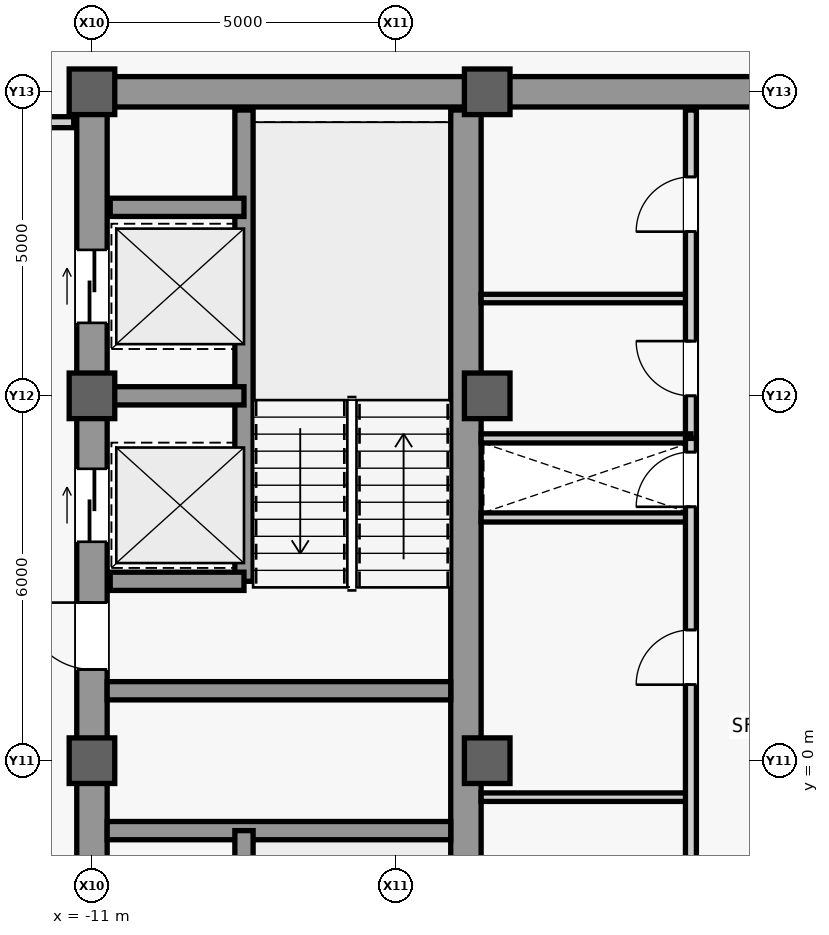
"""IFC4 building model, lengths in metres.
Left out: names, types, materials, properties, quantities, classifications, styles, units other than length and angle.
Written with IfcOpenShell. Run it as: python <this file> out.ifc"""

import sys

from ifc_helpers import new_model, si_unit, direction, frame, frame_2d, origin, origin_2d, place, context, subcontext, project, spatial, rectangle, extrude, source, transform, mapped, element, fill, save


model = new_model("IFC4")
c1 = context("Model", 3, precision=1e-05, world=origin(), true_north=direction((0.0, 1.0)))
c2 = subcontext(c1, "Body", "Model", "MODEL_VIEW")
j1 = project(units=[si_unit("LENGTHUNIT", "METRE"), si_unit("PLANEANGLEUNIT", "RADIAN")], contexts=[c1])
p1 = place(None, origin())
s1 = spatial("IfcSite", under=j1, at=p1, CompositionType="ELEMENT")
p2 = place(p1, origin())
s2 = spatial("IfcBuilding", under=s1, at=p2, CompositionType="ELEMENT")
p3 = place(p2, frame((0.0, 0.0, 326.3)))
s3 = spatial("IfcBuildingStorey", under=s2, at=p3, CompositionType="ELEMENT", Elevation=326.3)
m1 = source(origin(), c2, "Body", "SweptSolid", [
    extrude(rectangle(XDim=22.0, YDim=0.5, at=frame_2d((11.0, 0.0))), origin(), (0.0, 0.0, 1.0), 3.74),
])
p4 = place(p3, frame((-11.0, -11.0, 0.0), z_axis=(0.0, 0.0, 1.0), x_axis=(0.0, 1.0, 0.0)))
e1 = element("IfcWall", 1, at=p4, inside=s3, PredefinedType="SHEAR", context=c2, shape_type="MappedRepresentation", body=[
    mapped(m1, transform((0.0, 0.0, 0.0), scale=1.0)),
])
m2 = source(origin(), c2, "Body", "SweptSolid", [
    extrude(rectangle(XDim=1.1, YDim=2.2, at=frame_2d((0.55, 1.1))), frame((0.0, 0.26, 0.0), z_axis=(0.0, -1.0, 0.0), x_axis=(1.0, 0.0, 0.0)), (0.0, 0.0, 1.0), 0.52),
])
p5 = place(p4, frame((0.8, 0.0, 0.0)))
e2 = element("IfcOpeningElement", 2, at=p5, cuts=e1, PredefinedType="OPENING", context=c2, shape_type="MappedRepresentation", body=[
    mapped(m2, transform((0.0, 0.0, 0.0), scale=1.0)),
])
p6 = place(p4, frame((12.5, 0.0, 0.0)))
e3 = element("IfcOpeningElement", 3, at=p6, cuts=e1, PredefinedType="OPENING", context=c2, shape_type="MappedRepresentation", body=[
    mapped(m2, transform((0.0, 0.0, 0.0), scale=1.0)),
])
m3 = source(origin(), c2, "Body", "SweptSolid", [
    extrude(rectangle(XDim=0.9, YDim=2.15, at=frame_2d((0.45, 1.075))), frame((0.0, 0.26, 0.0), z_axis=(0.0, -1.0, 0.0), x_axis=(1.0, 0.0, 0.0)), (0.0, 0.0, 1.0), 0.52),
])
p7 = place(p4, frame((7.575, 0.0, 0.0)))
e4 = element("IfcOpeningElement", 4, at=p7, cuts=e1, PredefinedType="OPENING", context=c2, shape_type="MappedRepresentation", body=[
    mapped(m3, transform((0.0, 0.0, 0.0), scale=1.0)),
])
m4 = source(origin(), c2, "Body", "SweptSolid", [
    extrude(rectangle(XDim=1.2, YDim=2.3, at=frame_2d((0.6, 1.15))), frame((0.0, 0.26, 0.0), z_axis=(0.0, -1.0, 0.0), x_axis=(1.0, 0.0, 0.0)), (0.0, 0.0, 1.0), 0.52),
])
p8 = place(p4, frame((14.6, 0.0, 0.0)))
e5 = element("IfcOpeningElement", 5, at=p8, cuts=e1, PredefinedType="OPENING", context=c2, shape_type="MappedRepresentation", body=[
    mapped(m4, transform((0.0, 0.0, 0.0), scale=1.0)),
])
p9 = place(p4, frame((18.2, 0.0, 0.0)))
e6 = element("IfcOpeningElement", 6, at=p9, cuts=e1, PredefinedType="OPENING", context=c2, shape_type="MappedRepresentation", body=[
    mapped(m4, transform((0.0, 0.0, 0.0), scale=1.0)),
])
m5 = source(origin(), c2, "Body", "SweptSolid", [
    extrude(rectangle(XDim=1.3, YDim=2.3, at=frame_2d((0.65, 1.15))), frame((0.0, 0.26, 0.0), z_axis=(0.0, -1.0, 0.0), x_axis=(1.0, 0.0, 0.0)), (0.0, 0.0, 1.0), 0.52),
])
p10 = place(p4, frame((2.7, 0.0, 0.0)))
e7 = element("IfcOpeningElement", 7, at=p10, cuts=e1, PredefinedType="OPENING", context=c2, shape_type="MappedRepresentation", body=[
    mapped(m5, transform((0.0, 0.0, 0.0), scale=1.0)),
])
m6 = source(origin(), c2, "Body", "SweptSolid", [
    extrude(rectangle(XDim=21.4, YDim=0.5, at=frame_2d((10.7, 0.0))), origin(), (0.0, 0.0, 1.0), 3.74),
])
p11 = place(p3, frame((-4.85, -10.7, 0.0), z_axis=(0.0, 0.0, 1.0), x_axis=(0.0, 1.0, 0.0)))
e8 = element("IfcWall", 8, at=p11, inside=s3, PredefinedType="SHEAR", context=c2, shape_type="MappedRepresentation", body=[
    mapped(m6, transform((0.0, 0.0, 0.0), scale=1.0)),
])
m7 = source(origin(), c2, "Body", "SweptSolid", [
    extrude(rectangle(XDim=5.9, YDim=0.5, at=frame_2d((2.95, 0.0))), origin(), (0.0, 0.0, 1.0), 3.74),
])
p12 = place(p3, frame((-10.75, 11.0, 0.0), z_axis=(0.0, 0.0, 1.0), x_axis=(1.0, 0.0, 0.0)))
e9 = element("IfcWall", 9, at=p12, inside=s3, PredefinedType="SHEAR", context=c2, shape_type="MappedRepresentation", body=[
    mapped(m7, transform((0.0, 0.0, 0.0), scale=1.0)),
])
m8 = source(origin(), c2, "Body", "SweptSolid", [
    extrude(rectangle(XDim=5.65, YDim=0.3, at=frame_2d((2.825, 0.0))), origin(), (0.0, 0.0, 1.0), 3.74),
])
for number, where, z_axis, x_axis in (
    (10, (-10.75, -1.15, 0.0), (0.0, 0.0, 1.0), (1.0, 0.0, 0.0)),
    (11, (-10.75, 1.15, 0.0), (0.0, 0.0, 1.0), (1.0, 0.0, 0.0)),
):
    element("IfcWall", number, at=place(p3, frame(where, z_axis=z_axis, x_axis=x_axis)), inside=s3, PredefinedType="SHEAR", context=c2, shape_type="MappedRepresentation", body=[
        mapped(m8, transform((0.0, 0.0, 0.0), scale=1.0)),
    ])
m9 = source(origin(), c2, "Body", "SweptSolid", [
    extrude(rectangle(XDim=9.2, YDim=0.5, at=frame_2d((4.6, 0.0))), origin(), (0.0, 0.0, 1.0), 3.74),
])
p13 = place(p3, frame((-4.6, 11.0, 0.0), z_axis=(0.0, 0.0, 1.0), x_axis=(1.0, 0.0, 0.0)))
e12 = element("IfcWall", 12, at=p13, inside=s3, PredefinedType="SHEAR", context=c2, shape_type="MappedRepresentation", body=[
    mapped(m9, transform((0.0, 0.0, 0.0), scale=1.0)),
])
m10 = source(origin(), c2, "Body", "SweptSolid", [
    extrude(rectangle(XDim=0.75, YDim=0.75, at=origin_2d()), origin(), (0.0, 0.0, 1.0), 4.0),
])
for number, where, z_axis, x_axis in (
    (13, (-11.0, 0.0, 0.0), (0.0, 0.0, 1.0), (1.0, 0.0, 0.0)),
    (14, (-11.0, 6.0, 0.0), (0.0, 0.0, 1.0), (1.0, 0.0, 0.0)),
    (15, (-11.0, 11.0, 0.0), (0.0, 0.0, 1.0), (1.0, 0.0, 0.0)),
    (16, (-4.5, 0.0, 0.0), (0.0, 0.0, 1.0), (1.0, 0.0, 0.0)),
    (17, (-4.5, 6.0, 0.0), (0.0, 0.0, 1.0), (1.0, 0.0, 0.0)),
    (18, (-4.5, 11.0, 0.0), (0.0, 0.0, 1.0), (1.0, 0.0, 0.0)),
):
    element("IfcColumn", number, at=place(p3, frame(where, z_axis=z_axis, x_axis=x_axis)), inside=s3, PredefinedType="COLUMN", context=c2, shape_type="MappedRepresentation", body=[
        mapped(m10, transform((0.0, 0.0, 0.0), scale=1.0)),
    ])
m11 = source(origin(), c2, "Body", "SweptSolid", [
    extrude(rectangle(XDim=7.8, YDim=0.3, at=frame_2d((3.9, 0.0))), origin(), (0.0, 0.0, 1.0), 3.74),
])
p14 = place(p3, frame((-8.5, -8.95, 0.0), z_axis=(0.0, 0.0, 1.0), x_axis=(0.0, 1.0, 0.0)))
e19 = element("IfcWall", 19, at=p14, inside=s3, PredefinedType="SHEAR", context=c2, shape_type="MappedRepresentation", body=[
    mapped(m11, transform((0.0, 0.0, 0.0), scale=1.0)),
])
m12 = source(origin(), c2, "Body", "SweptSolid", [
    extrude(rectangle(XDim=7.75, YDim=0.3, at=frame_2d((3.875, 0.0))), origin(), (0.0, 0.0, 1.0), 3.74),
])
p15 = place(p3, frame((-8.5, 2.95, 0.0), z_axis=(0.0, 0.0, 1.0), x_axis=(0.0, 1.0, 0.0)))
e20 = element("IfcWall", 20, at=p15, inside=s3, PredefinedType="SHEAR", context=c2, shape_type="MappedRepresentation", body=[
    mapped(m12, transform((0.0, 0.0, 0.0), scale=1.0)),
])
m13 = source(origin(), c2, "Body", "SweptSolid", [
    extrude(rectangle(XDim=2.2, YDim=0.3, at=frame_2d((1.1, 0.0))), origin(), (0.0, 0.0, 1.0), 3.74),
])
for number, where, z_axis, x_axis in (
    (21, (-10.7, 2.95, 0.0), (0.0, 0.0, 1.0), (1.0, 0.0, 0.0)),
    (22, (-10.7, 6.0, 0.0), (0.0, 0.0, 1.0), (1.0, 0.0, 0.0)),
    (23, (-10.7, 9.1, 0.0), (0.0, 0.0, 1.0), (1.0, 0.0, 0.0)),
):
    element("IfcWall", number, at=place(p3, frame(where, z_axis=z_axis, x_axis=x_axis)), inside=s3, PredefinedType="SHEAR", context=c2, shape_type="MappedRepresentation", body=[
        mapped(m13, transform((0.0, 0.0, 0.0), scale=1.0)),
    ])
m14 = source(origin(), c2, "Body", "SweptSolid", [
    extrude(rectangle(XDim=4.05, YDim=0.18, at=frame_2d((2.025, 0.0))), origin(), (0.0, 0.0, 1.0), 3.74),
])
p16 = place(p3, frame((-15.35, 10.5, 0.0), z_axis=(0.0, 0.0, 1.0), x_axis=(1.0, 0.0, 0.0)))
e24 = element("IfcWall", 24, at=p16, inside=s3, PredefinedType="PARTITIONING", context=c2, shape_type="MappedRepresentation", body=[
    mapped(m14, transform((0.0, 0.0, 0.0), scale=1.0)),
])
m15 = source(origin(), c2, "Body", "SweptSolid", [
    extrude(rectangle(XDim=3.45, YDim=0.15, at=frame_2d((1.725, 0.0))), origin(), (0.0, 0.0, 1.0), 3.74),
])
p17 = place(p3, frame((-4.6, 4.0, 0.0), z_axis=(0.0, 0.0, 1.0), x_axis=(1.0, 0.0, 0.0)))
e25 = element("IfcWall", 25, at=p17, inside=s3, PredefinedType="PARTITIONING", context=c2, shape_type="MappedRepresentation", body=[
    mapped(m15, transform((0.0, 0.0, 0.0), scale=1.0)),
])
m16 = source(origin(), c2, "Body", "SweptSolid", [
    extrude(rectangle(XDim=3.45, YDim=0.14, at=frame_2d((1.725, 0.0))), origin(), (0.0, 0.0, 1.0), 3.74),
])
p18 = place(p3, frame((-4.6, 7.6, 0.0), z_axis=(0.0, 0.0, 1.0), x_axis=(1.0, 0.0, 0.0)))
e26 = element("IfcWall", 26, at=p18, inside=s3, PredefinedType="PARTITIONING", context=c2, shape_type="MappedRepresentation", body=[
    mapped(m16, transform((0.0, 0.0, 0.0), scale=1.0)),
])
m17 = source(origin(), c2, "Body", "SweptSolid", [
    extrude(rectangle(XDim=5.4, YDim=0.18, at=frame_2d((2.7, 0.0))), origin(), (0.0, 0.0, 1.0), 3.74),
])
p19 = place(p3, frame((-1.15, 5.3, 0.0), z_axis=(0.0, 0.0, 1.0), x_axis=(0.0, 1.0, 0.0)))
e27 = element("IfcWall", 27, at=p19, inside=s3, PredefinedType="PARTITIONING", context=c2, shape_type="MappedRepresentation", body=[
    mapped(m17, transform((0.0, 0.0, 0.0), scale=1.0)),
])
m18 = source(origin(), c2, "Body", "SweptSolid", [
    extrude(rectangle(XDim=0.9, YDim=2.15, at=frame_2d((0.45, 1.075))), frame((0.0, 0.1, 0.0), z_axis=(0.0, -1.0, 0.0), x_axis=(1.0, 0.0, 0.0)), (0.0, 0.0, 1.0), 0.2),
])
p20 = place(p19, frame((0.7, 0.0, 0.0)))
e28 = element("IfcOpeningElement", 28, at=p20, cuts=e27, PredefinedType="OPENING", context=c2, shape_type="MappedRepresentation", body=[
    mapped(m18, transform((0.0, 0.0, 0.0), scale=1.0)),
])
p21 = place(p19, frame((3.4, 0.0, 0.0)))
e29 = element("IfcOpeningElement", 29, at=p21, cuts=e27, PredefinedType="OPENING", context=c2, shape_type="MappedRepresentation", body=[
    mapped(m18, transform((0.0, 0.0, 0.0), scale=1.0)),
])
p22 = place(p3, frame((-4.6, 5.3, 0.0), z_axis=(0.0, 0.0, 1.0), x_axis=(1.0, 0.0, 0.0)))
e30 = element("IfcWall", 30, at=p22, inside=s3, PredefinedType="PARTITIONING", context=c2, shape_type="MappedRepresentation", body=[
    mapped(m15, transform((0.0, 0.0, 0.0), scale=1.0)),
])
p23 = place(p3, frame((-4.6, -0.6, 0.0), z_axis=(0.0, 0.0, 1.0), x_axis=(1.0, 0.0, 0.0)))
e31 = element("IfcWall", 31, at=p23, inside=s3, PredefinedType="PARTITIONING", context=c2, shape_type="MappedRepresentation", body=[
    mapped(m16, transform((0.0, 0.0, 0.0), scale=1.0)),
])
m19 = source(origin(), c2, "Body", "SweptSolid", [
    extrude(rectangle(XDim=10.6, YDim=0.18, at=frame_2d((5.3, 0.0))), origin(), (0.0, 0.0, 1.0), 3.74),
])
p24 = place(p3, frame((-1.15, -5.3, 0.0), z_axis=(0.0, 0.0, 1.0), x_axis=(0.0, 1.0, 0.0)))
e32 = element("IfcWall", 32, at=p24, inside=s3, PredefinedType="PARTITIONING", context=c2, shape_type="MappedRepresentation", body=[
    mapped(m19, transform((0.0, 0.0, 0.0), scale=1.0)),
])
p25 = place(p24, frame((1.9, 0.0, 0.0)))
e33 = element("IfcOpeningElement", 33, at=p25, cuts=e32, PredefinedType="OPENING", context=c2, shape_type="MappedRepresentation", body=[
    mapped(m18, transform((0.0, 0.0, 0.0), scale=1.0)),
])
p26 = place(p24, frame((6.55, 0.0, 0.0)))
e34 = element("IfcOpeningElement", 34, at=p26, cuts=e32, PredefinedType="OPENING", context=c2, shape_type="MappedRepresentation", body=[
    mapped(m18, transform((0.0, 0.0, 0.0), scale=1.0)),
])
p27 = place(p24, frame((9.475, 0.0, 0.0)))
e35 = element("IfcOpeningElement", 35, at=p27, cuts=e32, PredefinedType="OPENING", context=c2, shape_type="MappedRepresentation", body=[
    mapped(m18, transform((0.0, 0.0, 0.0), scale=1.0)),
])
m20 = source(origin(), c2, "Body", "SweptSolid", [
    extrude(rectangle(XDim=1.1, YDim=2.2, at=frame_2d((0.55, 1.1))), frame((0.0, 0.025, 0.0), z_axis=(0.0, -1.0, 0.0), x_axis=(1.0, 0.0, 0.0)), (0.0, 0.0, 1.0), 0.05),
])
p28 = place(p6, origin())
e36 = element("IfcDoor", 36, at=p28, inside=s3, OperationType="SINGLE_SWING_RIGHT", PredefinedType="DOOR", context=c2, shape_type="MappedRepresentation", body=[
    mapped(m20, transform((0.0, 0.0, 0.0), scale=1.0)),
])
fill(e3, e36)
m21 = source(origin(), c2, "Body", "SweptSolid", [
    extrude(rectangle(XDim=0.9, YDim=2.15, at=frame_2d((0.45, 1.075))), frame((0.0, 0.025, 0.0), z_axis=(0.0, -1.0, 0.0), x_axis=(1.0, 0.0, 0.0)), (0.0, 0.0, 1.0), 0.05),
])
p29 = place(p20, origin())
e37 = element("IfcDoor", 37, at=p29, inside=s3, OperationType="SINGLE_SWING_RIGHT", PredefinedType="DOOR", context=c2, shape_type="MappedRepresentation", body=[
    mapped(m21, transform((0.0, 0.0, 0.0), scale=1.0)),
])
fill(e28, e37)
p30 = place(p21, origin())
e38 = element("IfcDoor", 38, at=p30, inside=s3, OperationType="SINGLE_SWING_LEFT", PredefinedType="DOOR", context=c2, shape_type="MappedRepresentation", body=[
    mapped(m21, transform((0.0, 0.0, 0.0), scale=1.0)),
])
fill(e29, e38)
p31 = place(p26, origin())
e39 = element("IfcDoor", 39, at=p31, inside=s3, OperationType="SINGLE_SWING_LEFT", PredefinedType="DOOR", context=c2, shape_type="MappedRepresentation", body=[
    mapped(m21, transform((0.0, 0.0, 0.0), scale=1.0)),
])
fill(e34, e39)
p32 = place(p27, origin())
e40 = element("IfcDoor", 40, at=p32, inside=s3, OperationType="SINGLE_SWING_LEFT", PredefinedType="DOOR", context=c2, shape_type="MappedRepresentation", body=[
    mapped(m21, transform((0.0, 0.0, 0.0), scale=1.0)),
])
fill(e35, e40)
m22 = source(origin(), c2, "Body", "SweptSolid", [
    extrude(rectangle(XDim=1.2, YDim=2.3, at=frame_2d((0.6, 1.15))), frame((0.0, 0.025, 0.0), z_axis=(0.0, -1.0, 0.0), x_axis=(1.0, 0.0, 0.0)), (0.0, 0.0, 1.0), 0.05),
])
p33 = place(p8, origin())
e41 = element("IfcDoor", 41, at=p33, inside=s3, OperationType="SLIDING_TO_LEFT", PredefinedType="DOOR", context=c2, shape_type="MappedRepresentation", body=[
    mapped(m22, transform((0.0, 0.0, 0.0), scale=1.0)),
])
fill(e5, e41)
p34 = place(p9, origin())
e42 = element("IfcDoor", 42, at=p34, inside=s3, OperationType="SLIDING_TO_LEFT", PredefinedType="DOOR", context=c2, shape_type="MappedRepresentation", body=[
    mapped(m22, transform((0.0, 0.0, 0.0), scale=1.0)),
])
fill(e6, e42)
save(model, sys.argv[1])
